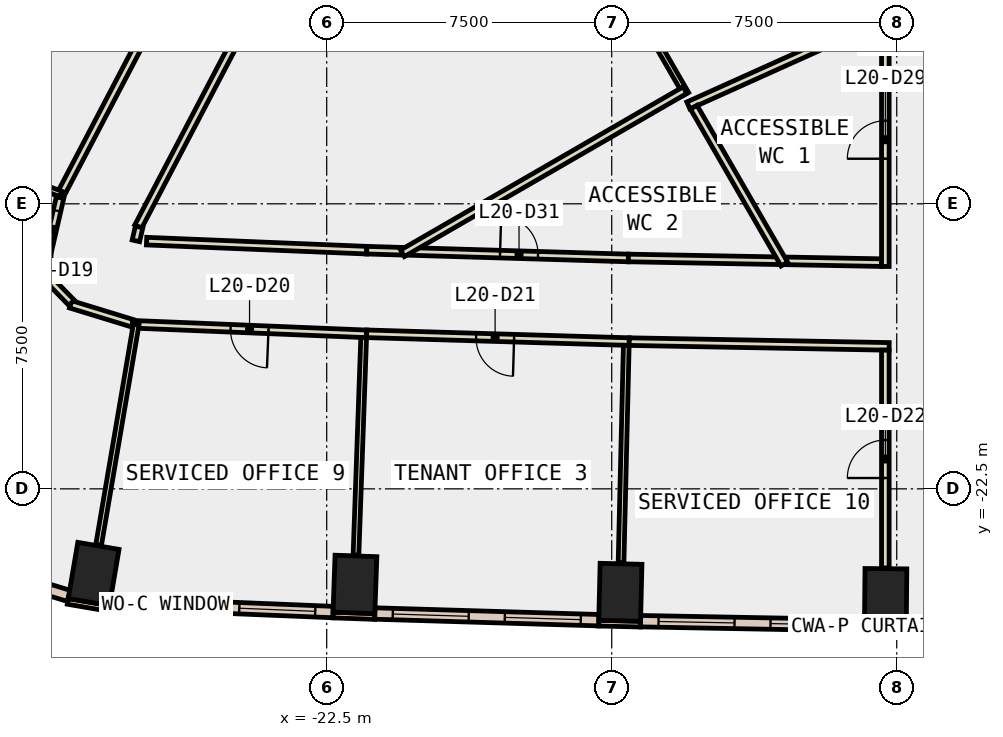
"""IFC4 building model, lengths in metres.
Left out: names, types, materials, properties, quantities, classifications, styles, units other than length and angle.
Written with IfcOpenShell. Run it as: python <this file> out.ifc"""

import sys

from ifc_helpers import new_model, si_unit, direction, frame, frame_2d, origin, origin_2d, place, context, subcontext, project, spatial, rectangle, extrude, element, fill, save


model = new_model("IFC4")
c1 = context("Model", 3, precision=1e-05, world=origin(), true_north=direction((0.0, 1.0)))
c2 = subcontext(c1, "Body", "Model", "MODEL_VIEW")
j1 = project(units=[si_unit("LENGTHUNIT", "METRE"), si_unit("PLANEANGLEUNIT", "RADIAN")], contexts=[c1])
p1 = place(None, origin())
s1 = spatial("IfcSite", under=j1, at=p1, CompositionType="ELEMENT")
p2 = place(p1, origin())
s2 = spatial("IfcBuilding", under=s1, at=p2, CompositionType="ELEMENT")
p3 = place(p2, frame((0.0, 0.0, 95.0)))
s3 = spatial("IfcBuildingStorey", under=s2, at=p3, CompositionType="ELEMENT", Elevation=95.0)
for number, where, z_axis, x_axis in (
    (1, (-28.633, -24.74, -0.4), (0.0, 0.0, 1.0), (-0.986, 0.168, 0.0)),
    (2, (-21.757, -25.015, -0.4), (0.0, 0.0, 1.0), (-0.999, 0.035, 0.0)),
    (3, (-14.773, -25.222, -0.4), (0.0, 0.0, 1.0), (-1.0, 0.024, 0.0)),
    (4, (-7.792, -25.351, -0.4), (0.0, 0.0, 1.0), (-1.0, 0.009, 0.0)),
):
    element("IfcColumn", number, at=place(p3, frame(where, z_axis=z_axis, x_axis=x_axis)), inside=s3, PredefinedType="COLUMN", context=c2, shape_type="SweptSolid", body=[
        extrude(rectangle(XDim=1.1, YDim=1.5, at=origin_2d()), origin(), (0.0, 0.0, 1.0), 4.2),
    ])
p4 = place(p3, frame((-29.314, -25.461, 0.0), z_axis=(0.0, 0.0, 1.0), x_axis=(0.985763338892, -0.168138751323, 0.0)))
e5 = element("IfcWall", 5, at=p4, inside=s3, PredefinedType="STANDARD", context=c2, shape_type="SweptSolid", body=[
    extrude(rectangle(XDim=1.101, YDim=0.15, at=frame_2d((0.55, 0.0))), origin(), (0.0, 0.0, 1.0), 3.8),
])
p5 = place(p3, frame((-22.336, -25.82, 0.0), z_axis=(0.0, 0.0, 1.0), x_axis=(0.999376638472, -0.035303462679, 0.0)))
e6 = element("IfcWall", 6, at=p5, inside=s3, PredefinedType="STANDARD", context=c2, shape_type="SweptSolid", body=[
    extrude(rectangle(XDim=1.1, YDim=0.15, at=frame_2d((0.55, 0.0))), origin(), (0.0, 0.0, 1.0), 3.8),
])
p6 = place(p3, frame((-15.343, -26.034, 0.0), z_axis=(0.0, 0.0, 1.0), x_axis=(0.999718180159, -0.023739424163, 0.0)))
e7 = element("IfcWall", 7, at=p6, inside=s3, PredefinedType="STANDARD", context=c2, shape_type="SweptSolid", body=[
    extrude(rectangle(XDim=1.1, YDim=0.15, at=frame_2d((0.55, 0.0))), origin(), (0.0, 0.0, 1.0), 3.8),
])
p7 = place(p3, frame((-8.349, -26.171, 0.0), z_axis=(0.0, 0.0, 1.0), x_axis=(0.99995860686, -0.009098602504, 0.0)))
e8 = element("IfcWall", 8, at=p7, inside=s3, PredefinedType="STANDARD", context=c2, shape_type="SweptSolid", body=[
    extrude(rectangle(XDim=1.1, YDim=0.15, at=frame_2d((0.55, 0.0))), origin(), (0.0, 0.0, 1.0), 3.8),
])
p8 = place(p3, frame((-28.205, -25.501, 0.0), z_axis=(0.0, 0.0, 1.0), x_axis=(0.999159360905, -0.040994774244, 0.0)))
e9 = element("IfcWall", 9, at=p8, inside=s3, PredefinedType="STANDARD", context=c2, shape_type="SweptSolid", body=[
    extrude(rectangle(XDim=5.878, YDim=0.3, at=frame_2d((2.939, 0.0))), origin(), (0.0, 0.0, 1.0), 3.8),
])
p9 = place(p8, frame((0.469, 0.0, 0.9)))
e10 = element("IfcOpeningElement", 10, at=p9, cuts=e9, PredefinedType="OPENING", context=c2, shape_type="SweptSolid", body=[
    extrude(rectangle(XDim=2.0, YDim=2.6, at=frame_2d((1.0, 1.3))), frame((0.0, 0.16, 0.0), z_axis=(0.0, -1.0, 0.0), x_axis=(1.0, 0.0, 0.0)), (0.0, 0.0, 1.0), 0.32),
])
p10 = place(p8, frame((3.408, 0.0, 0.9)))
e11 = element("IfcOpeningElement", 11, at=p10, cuts=e9, PredefinedType="OPENING", context=c2, shape_type="SweptSolid", body=[
    extrude(rectangle(XDim=2.0, YDim=2.6, at=frame_2d((1.0, 1.3))), frame((0.0, 0.16, 0.0), z_axis=(0.0, -1.0, 0.0), x_axis=(1.0, 0.0, 0.0)), (0.0, 0.0, 1.0), 0.32),
])
p11 = place(p3, frame((-21.235, -25.78, 0.0), z_axis=(0.0, 0.0, 1.0), x_axis=(0.999554487555, -0.029846715213, 0.0)))
e12 = element("IfcWall", 12, at=p11, inside=s3, PredefinedType="STANDARD", context=c2, shape_type="SweptSolid", body=[
    extrude(rectangle(XDim=5.898, YDim=0.3, at=frame_2d((2.949, 0.0))), origin(), (0.0, 0.0, 1.0), 3.8),
])
p12 = place(p11, frame((0.474, 0.0, 0.9)))
e13 = element("IfcOpeningElement", 13, at=p12, cuts=e12, PredefinedType="OPENING", context=c2, shape_type="SweptSolid", body=[
    extrude(rectangle(XDim=2.0, YDim=2.6, at=frame_2d((1.0, 1.3))), frame((0.0, 0.16, 0.0), z_axis=(0.0, -1.0, 0.0), x_axis=(1.0, 0.0, 0.0)), (0.0, 0.0, 1.0), 0.32),
])
p13 = place(p11, frame((3.423, 0.0, 0.9)))
e14 = element("IfcOpeningElement", 14, at=p13, cuts=e12, PredefinedType="OPENING", context=c2, shape_type="SweptSolid", body=[
    extrude(rectangle(XDim=2.0, YDim=2.6, at=frame_2d((1.0, 1.3))), frame((0.0, 0.16, 0.0), z_axis=(0.0, -1.0, 0.0), x_axis=(1.0, 0.0, 0.0)), (0.0, 0.0, 1.0), 0.32),
])
p14 = place(p3, frame((-14.242, -25.982, 0.0), z_axis=(0.0, 0.0, 1.0), x_axis=(0.999828633111, -0.018512277318, 0.0)))
e15 = element("IfcWall", 15, at=p14, inside=s3, PredefinedType="STANDARD", context=c2, shape_type="SweptSolid", body=[
    extrude(rectangle(XDim=5.895, YDim=0.3, at=frame_2d((2.948, 0.0))), origin(), (0.0, 0.0, 1.0), 3.8),
])
p15 = place(p14, frame((0.474, 0.0, 0.9)))
e16 = element("IfcOpeningElement", 16, at=p15, cuts=e15, PredefinedType="OPENING", context=c2, shape_type="SweptSolid", body=[
    extrude(rectangle(XDim=2.0, YDim=2.6, at=frame_2d((1.0, 1.3))), frame((0.0, 0.16, 0.0), z_axis=(0.0, -1.0, 0.0), x_axis=(1.0, 0.0, 0.0)), (0.0, 0.0, 1.0), 0.32),
])
p16 = place(p14, frame((3.421, 0.0, 0.9)))
e17 = element("IfcOpeningElement", 17, at=p16, cuts=e15, PredefinedType="OPENING", context=c2, shape_type="SweptSolid", body=[
    extrude(rectangle(XDim=2.0, YDim=2.6, at=frame_2d((1.0, 1.3))), frame((0.0, 0.16, 0.0), z_axis=(0.0, -1.0, 0.0), x_axis=(1.0, 0.0, 0.0)), (0.0, 0.0, 1.0), 0.32),
])
p17 = place(p3, frame((-32.549, -24.319, 0.0), z_axis=(0.0, 0.0, 1.0), x_axis=(0.956317661006, -0.292329490895, 0.0)))
e18 = element("IfcWall", 18, at=p17, inside=s3, PredefinedType="STANDARD", context=c2, shape_type="SweptSolid", body=[
    extrude(rectangle(XDim=3.41, YDim=0.3, at=frame_2d((1.705, 0.0))), origin(), (0.0, 0.0, 1.0), 3.8),
])
p18 = place(p17, frame((1.005, 0.0, 0.9)))
e19 = element("IfcOpeningElement", 19, at=p18, cuts=e18, PredefinedType="OPENING", context=c2, shape_type="SweptSolid", body=[
    extrude(rectangle(XDim=1.4, YDim=2.6, at=frame_2d((0.7, 1.3))), frame((0.0, 0.16, 0.0), z_axis=(0.0, -1.0, 0.0), x_axis=(1.0, 0.0, 0.0)), (0.0, 0.0, 1.0), 0.32),
])
p19 = place(p3, frame((-10.408, -16.501, 0.0), z_axis=(0.0, 0.0, 1.0), x_axis=(0.999823568917, -0.018783797216, 0.0)))
e20 = element("IfcWall", 20, at=p19, inside=s3, PredefinedType="PARTITIONING", context=c2, shape_type="SweptSolid", body=[
    extrude(rectangle(XDim=2.509, YDim=0.2, at=frame_2d((1.254, 0.0))), origin(), (0.0, 0.0, 1.0), 3.8),
])
p20 = place(p3, frame((-24.678, -10.29, 0.0), z_axis=(0.0, 0.0, 1.0), x_axis=(-0.464203280494, -0.885728691179, 0.0)))
e21 = element("IfcWall", 21, at=p20, inside=s3, PredefinedType="PARTITIONING", context=c2, shape_type="SweptSolid", body=[
    extrude(rectangle(XDim=5.995, YDim=0.2, at=frame_2d((2.998, 0.0))), origin(), (0.0, 0.0, 1.0), 3.8),
])
p21 = place(p3, frame((-27.437, -15.609, 0.0), z_axis=(0.0, 0.0, 1.0), x_axis=(-0.224098195188, -0.97456656977, 0.0)))
e22 = element("IfcWall", 22, at=p21, inside=s3, PredefinedType="PARTITIONING", context=c2, shape_type="SweptSolid", body=[
    extrude(rectangle(XDim=0.375, YDim=0.2, at=frame_2d((0.188, 0.0))), origin(), (0.0, 0.0, 1.0), 3.8),
])
p22 = place(p3, frame((-27.24, -15.982, 0.0), z_axis=(0.0, 0.0, 1.0), x_axis=(0.999157128819, -0.041049140426, 0.0)))
e23 = element("IfcWall", 23, at=p22, inside=s3, PredefinedType="PARTITIONING", context=c2, shape_type="SweptSolid", body=[
    extrude(rectangle(XDim=5.799, YDim=0.2, at=frame_2d((2.899, 0.0))), origin(), (0.0, 0.0, 1.0), 3.8),
])
p23 = place(p3, frame((-21.446, -16.22, 0.0), z_axis=(0.0, 0.0, 1.0), x_axis=(0.999542625536, -0.030241358047, 0.0)))
e24 = element("IfcWall", 24, at=p23, inside=s3, PredefinedType="PARTITIONING", context=c2, shape_type="SweptSolid", body=[
    extrude(rectangle(XDim=0.928, YDim=0.2, at=frame_2d((0.464, 0.0))), origin(), (0.0, 0.0, 1.0), 3.8),
])
p24 = place(p3, frame((-20.318, -16.253, 0.0), z_axis=(0.0, 0.0, 1.0), x_axis=(0.999553385537, -0.029883598524, 0.0)))
e25 = element("IfcWall", 25, at=p24, inside=s3, PredefinedType="PARTITIONING", context=c2, shape_type="SweptSolid", body=[
    extrude(rectangle(XDim=5.76, YDim=0.2, at=frame_2d((2.88, 0.0))), origin(), (0.0, 0.0, 1.0), 3.8),
])
p25 = place(p24, frame((2.38, 0.0, 0.0)))
e26 = element("IfcOpeningElement", 26, at=p25, cuts=e25, PredefinedType="OPENING", context=c2, shape_type="SweptSolid", body=[
    extrude(rectangle(XDim=1.0, YDim=2.1, at=frame_2d((0.5, 1.05))), frame((0.0, 0.11, 0.0), z_axis=(0.0, -1.0, 0.0), x_axis=(1.0, 0.0, 0.0)), (0.0, 0.0, 1.0), 0.22),
])
p26 = place(p3, frame((-14.561, -16.425, 0.0), z_axis=(0.0, 0.0, 1.0), x_axis=(0.999829548691, -0.018462761553, 0.0)))
e27 = element("IfcWall", 27, at=p26, inside=s3, PredefinedType="PARTITIONING", context=c2, shape_type="SweptSolid", body=[
    extrude(rectangle(XDim=3.954, YDim=0.2, at=frame_2d((1.977, 0.0))), origin(), (0.0, 0.0, 1.0), 3.8),
])
p27 = place(p3, frame((-29.541, -14.829, 0.0), z_axis=(0.0, 0.0, 1.0), x_axis=(0.46422598759, 0.885716790202, 0.0)))
e28 = element("IfcWall", 28, at=p27, inside=s3, PredefinedType="PARTITIONING", context=c2, shape_type="SweptSolid", body=[
    extrude(rectangle(XDim=6.29, YDim=0.2, at=frame_2d((3.145, 0.0))), origin(), (0.0, 0.0, 1.0), 3.8),
])
p28 = place(p3, frame((-27.608, -18.144, 0.0), z_axis=(0.0, 0.0, 1.0), x_axis=(-0.956137025409, 0.292919764852, 0.0)))
e29 = element("IfcWall", 29, at=p28, inside=s3, PredefinedType="PARTITIONING", context=c2, shape_type="SweptSolid", body=[
    extrude(rectangle(XDim=1.707, YDim=0.2, at=frame_2d((0.854, 0.0))), origin(), (0.0, 0.0, 1.0), 3.8),
])
p29 = place(p3, frame((-29.215, -17.602, 0.0), z_axis=(0.0, 0.0, 1.0), x_axis=(-0.698331924638, 0.715774072617, 0.0)))
e30 = element("IfcWall", 30, at=p29, inside=s3, PredefinedType="PARTITIONING", context=c2, shape_type="SweptSolid", body=[
    extrude(rectangle(XDim=0.756, YDim=0.2, at=frame_2d((0.378, 0.0))), origin(), (0.0, 0.0, 1.0), 3.8),
])
p30 = place(p3, frame((-29.701, -17.036, 0.0), z_axis=(0.0, 0.0, 1.0), x_axis=(-0.269792639482, 0.962918444979, 0.0)))
e31 = element("IfcWall", 31, at=p30, inside=s3, PredefinedType="PARTITIONING", context=c2, shape_type="SweptSolid", body=[
    extrude(rectangle(XDim=0.557, YDim=0.2, at=frame_2d((0.278, 0.0))), origin(), (0.0, 0.0, 1.0), 3.8),
])
p31 = place(p3, frame((-29.9, -16.501, 0.0), z_axis=(0.0, 0.0, 1.0), x_axis=(0.224316169854, 0.974516421587, 0.0)))
e32 = element("IfcWall", 32, at=p31, inside=s3, PredefinedType="PARTITIONING", context=c2, shape_type="SweptSolid", body=[
    extrude(rectangle(XDim=1.707, YDim=0.2, at=frame_2d((0.853, 0.0))), origin(), (0.0, 0.0, 1.0), 3.8),
])
p32 = place(p31, frame((0.353, 0.0, 0.0)))
e33 = element("IfcOpeningElement", 33, at=p32, cuts=e32, PredefinedType="OPENING", context=c2, shape_type="SweptSolid", body=[
    extrude(rectangle(XDim=1.0, YDim=2.1, at=frame_2d((0.5, 1.05))), frame((0.0, 0.11, 0.0), z_axis=(0.0, -1.0, 0.0), x_axis=(1.0, 0.0, 0.0)), (0.0, 0.0, 1.0), 0.22),
])
p33 = place(p3, frame((-21.449, -18.422, 0.0), z_axis=(0.0, 0.0, 1.0), x_axis=(-0.999157588083, 0.041037960189, 0.0)))
e34 = element("IfcWall", 34, at=p33, inside=s3, PredefinedType="PARTITIONING", context=c2, shape_type="SweptSolid", body=[
    extrude(rectangle(XDim=6.169, YDim=0.2, at=frame_2d((3.084, 0.0))), origin(), (0.0, 0.0, 1.0), 3.8),
])
p34 = place(p33, frame((2.584, 0.0, 0.0)))
e35 = element("IfcOpeningElement", 35, at=p34, cuts=e34, PredefinedType="OPENING", context=c2, shape_type="SweptSolid", body=[
    extrude(rectangle(XDim=1.0, YDim=2.1, at=frame_2d((0.5, 1.05))), frame((0.0, 0.11, 0.0), z_axis=(0.0, -1.0, 0.0), x_axis=(1.0, 0.0, 0.0)), (0.0, 0.0, 1.0), 0.22),
])
p35 = place(p3, frame((-14.539, -18.626, 0.0), z_axis=(0.0, 0.0, 1.0), x_axis=(-0.999555675329, 0.029806910574, 0.0)))
e36 = element("IfcWall", 36, at=p35, inside=s3, PredefinedType="PARTITIONING", context=c2, shape_type="SweptSolid", body=[
    extrude(rectangle(XDim=6.913, YDim=0.2, at=frame_2d((3.457, 0.0))), origin(), (0.0, 0.0, 1.0), 3.8),
])
p36 = place(p35, frame((3.031, 0.0, 0.0)))
e37 = element("IfcOpeningElement", 37, at=p36, cuts=e36, PredefinedType="OPENING", context=c2, shape_type="SweptSolid", body=[
    extrude(rectangle(XDim=1.0, YDim=2.1, at=frame_2d((0.5, 1.05))), frame((0.0, 0.11, 0.0), z_axis=(0.0, -1.0, 0.0), x_axis=(1.0, 0.0, 0.0)), (0.0, 0.0, 1.0), 0.22),
])
p37 = place(p3, frame((-7.7, -18.752, 0.0), z_axis=(0.0, 0.0, 1.0), x_axis=(-0.999830394604, 0.018416895142, 0.0)))
e38 = element("IfcWall", 38, at=p37, inside=s3, PredefinedType="PARTITIONING", context=c2, shape_type="SweptSolid", body=[
    extrude(rectangle(XDim=6.84, YDim=0.2, at=frame_2d((3.42, 0.0))), origin(), (0.0, 0.0, 1.0), 3.8),
])
p38 = place(p3, frame((-7.8, -16.649, 0.0), z_axis=(0.0, 0.0, 1.0), x_axis=(0.0, 1.0, 0.0)))
e39 = element("IfcWall", 39, at=p38, inside=s3, PredefinedType="PARTITIONING", context=c2, shape_type="SweptSolid", body=[
    extrude(rectangle(XDim=6.669, YDim=0.2, at=frame_2d((3.334, 0.0))), origin(), (0.0, 0.0, 1.0), 3.8),
])
p39 = place(p38, frame((2.835, 0.0, 0.0)))
e40 = element("IfcOpeningElement", 40, at=p39, cuts=e39, PredefinedType="OPENING", context=c2, shape_type="SweptSolid", body=[
    extrude(rectangle(XDim=1.0, YDim=2.1, at=frame_2d((0.5, 1.05))), frame((0.0, 0.11, 0.0), z_axis=(0.0, -1.0, 0.0), x_axis=(1.0, 0.0, 0.0)), (0.0, 0.0, 1.0), 0.22),
])
p40 = place(p3, frame((-7.8, -24.581, 0.0), z_axis=(0.0, 0.0, 1.0), x_axis=(0.0, 1.0, 0.0)))
e41 = element("IfcWall", 41, at=p40, inside=s3, PredefinedType="PARTITIONING", context=c2, shape_type="SweptSolid", body=[
    extrude(rectangle(XDim=5.731, YDim=0.2, at=frame_2d((2.865, 0.0))), origin(), (0.0, 0.0, 1.0), 3.8),
])
p41 = place(p40, frame((2.366, 0.0, 0.0)))
e42 = element("IfcOpeningElement", 42, at=p41, cuts=e41, PredefinedType="OPENING", context=c2, shape_type="SweptSolid", body=[
    extrude(rectangle(XDim=1.0, YDim=2.1, at=frame_2d((0.5, 1.05))), frame((0.0, 0.11, 0.0), z_axis=(0.0, -1.0, 0.0), x_axis=(1.0, 0.0, 0.0)), (0.0, 0.0, 1.0), 0.22),
])
p42 = place(p3, frame((-7.8, -10.08, 0.0), z_axis=(0.0, 0.0, 1.0), x_axis=(-0.911938383636, -0.410327167577, 0.0)))
e43 = element("IfcWall", 43, at=p42, inside=s3, PredefinedType="PARTITIONING", context=c2, shape_type="SweptSolid", body=[
    extrude(rectangle(XDim=5.683, YDim=0.2, at=frame_2d((2.842, 0.0))), origin(), (0.0, 0.0, 1.0), 3.8),
])
p43 = place(p3, frame((-13.043, -12.108, 0.0), z_axis=(0.0, 0.0, 1.0), x_axis=(-0.499947764329, 0.866055559963, 0.0)))
e44 = element("IfcWall", 44, at=p43, inside=s3, PredefinedType="PARTITIONING", context=c2, shape_type="SweptSolid", body=[
    extrude(rectangle(XDim=3.564, YDim=0.15, at=frame_2d((1.782, 0.0))), origin(), (0.0, 0.0, 1.0), 3.8),
])
p44 = place(p3, frame((-10.458, -16.586, 0.0), z_axis=(0.0, 0.0, 1.0), x_axis=(-0.500121439648, 0.865955279218, 0.0)))
e45 = element("IfcWall", 45, at=p44, inside=s3, PredefinedType="PARTITIONING", context=c2, shape_type="SweptSolid", body=[
    extrude(rectangle(XDim=4.767, YDim=0.2, at=frame_2d((2.383, 0.0))), origin(), (0.0, 0.0, 1.0), 3.8),
])
p45 = place(p3, frame((-13.072, -12.009, 0.0), z_axis=(0.0, 0.0, 1.0), x_axis=(-0.865993734772, -0.500054848326, 0.0)))
e46 = element("IfcWall", 46, at=p45, inside=s3, PredefinedType="PARTITIONING", context=c2, shape_type="SweptSolid", body=[
    extrude(rectangle(XDim=8.583, YDim=0.2, at=frame_2d((4.292, 0.0))), origin(), (0.0, 0.0, 1.0), 3.8),
])
p46 = place(p3, frame((-29.494, -14.741, 0.0), z_axis=(0.0, 0.0, 1.0), x_axis=(-0.937719767819, 0.347392626636, 0.0)))
e47 = element("IfcWall", 47, at=p46, inside=s3, PredefinedType="PARTITIONING", context=c2, shape_type="SweptSolid", body=[
    extrude(rectangle(XDim=5.892, YDim=0.15, at=frame_2d((2.946, 0.0))), origin(), (0.0, 0.0, 1.0), 3.8),
])
p47 = place(p3, frame((-27.513, -18.173, 0.0), z_axis=(0.0, 0.0, 1.0), x_axis=(-0.168033262309, -0.985781326034, 0.0)))
e48 = element("IfcWall", 48, at=p47, inside=s3, PredefinedType="PARTITIONING", context=c2, shape_type="SweptSolid", body=[
    extrude(rectangle(XDim=5.892, YDim=0.15, at=frame_2d((2.946, 0.0))), origin(), (0.0, 0.0, 1.0), 3.8),
])
p48 = place(p3, frame((-21.527, -18.519, 0.0), z_axis=(0.0, 0.0, 1.0), x_axis=(-0.035408838092, -0.999372910472, 0.0)))
e49 = element("IfcWall", 49, at=p48, inside=s3, PredefinedType="PARTITIONING", context=c2, shape_type="SweptSolid", body=[
    extrude(rectangle(XDim=5.73, YDim=0.15, at=frame_2d((2.865, 0.0))), origin(), (0.0, 0.0, 1.0), 3.8),
])
p49 = place(p3, frame((-14.617, -18.724, 0.0), z_axis=(0.0, 0.0, 1.0), x_axis=(-0.02407553942, -0.999710142192, 0.0)))
e50 = element("IfcWall", 50, at=p49, inside=s3, PredefinedType="PARTITIONING", context=c2, shape_type="SweptSolid", body=[
    extrude(rectangle(XDim=5.729, YDim=0.15, at=frame_2d((2.865, 0.0))), origin(), (0.0, 0.0, 1.0), 3.8),
])
p50 = place(p9, origin())
e51 = element("IfcWindow", 51, at=p50, inside=s3, PartitioningType="SINGLE_PANEL", PredefinedType="WINDOW", context=c2, shape_type="SweptSolid", body=[
    extrude(rectangle(XDim=2.0, YDim=2.6, at=frame_2d((1.0, 1.3))), frame((0.0, 0.03, 0.0), z_axis=(0.0, -1.0, 0.0), x_axis=(1.0, 0.0, 0.0)), (0.0, 0.0, 1.0), 0.06),
])
fill(e10, e51)
p51 = place(p10, origin())
e52 = element("IfcWindow", 52, at=p51, inside=s3, PartitioningType="SINGLE_PANEL", PredefinedType="WINDOW", context=c2, shape_type="SweptSolid", body=[
    extrude(rectangle(XDim=2.0, YDim=2.6, at=frame_2d((1.0, 1.3))), frame((0.0, 0.03, 0.0), z_axis=(0.0, -1.0, 0.0), x_axis=(1.0, 0.0, 0.0)), (0.0, 0.0, 1.0), 0.06),
])
fill(e11, e52)
p52 = place(p12, origin())
e53 = element("IfcWindow", 53, at=p52, inside=s3, PartitioningType="SINGLE_PANEL", PredefinedType="WINDOW", context=c2, shape_type="SweptSolid", body=[
    extrude(rectangle(XDim=2.0, YDim=2.6, at=frame_2d((1.0, 1.3))), frame((0.0, 0.03, 0.0), z_axis=(0.0, -1.0, 0.0), x_axis=(1.0, 0.0, 0.0)), (0.0, 0.0, 1.0), 0.06),
])
fill(e13, e53)
p53 = place(p13, origin())
e54 = element("IfcWindow", 54, at=p53, inside=s3, PartitioningType="SINGLE_PANEL", PredefinedType="WINDOW", context=c2, shape_type="SweptSolid", body=[
    extrude(rectangle(XDim=2.0, YDim=2.6, at=frame_2d((1.0, 1.3))), frame((0.0, 0.03, 0.0), z_axis=(0.0, -1.0, 0.0), x_axis=(1.0, 0.0, 0.0)), (0.0, 0.0, 1.0), 0.06),
])
fill(e14, e54)
p54 = place(p15, origin())
e55 = element("IfcWindow", 55, at=p54, inside=s3, PartitioningType="SINGLE_PANEL", PredefinedType="WINDOW", context=c2, shape_type="SweptSolid", body=[
    extrude(rectangle(XDim=2.0, YDim=2.6, at=frame_2d((1.0, 1.3))), frame((0.0, 0.03, 0.0), z_axis=(0.0, -1.0, 0.0), x_axis=(1.0, 0.0, 0.0)), (0.0, 0.0, 1.0), 0.06),
])
fill(e16, e55)
p55 = place(p16, origin())
e56 = element("IfcWindow", 56, at=p55, inside=s3, PartitioningType="SINGLE_PANEL", PredefinedType="WINDOW", context=c2, shape_type="SweptSolid", body=[
    extrude(rectangle(XDim=2.0, YDim=2.6, at=frame_2d((1.0, 1.3))), frame((0.0, 0.03, 0.0), z_axis=(0.0, -1.0, 0.0), x_axis=(1.0, 0.0, 0.0)), (0.0, 0.0, 1.0), 0.06),
])
fill(e17, e56)
p56 = place(p32, origin())
e57 = element("IfcDoor", 57, at=p56, inside=s3, OperationType="SINGLE_SWING_RIGHT", PredefinedType="DOOR", context=c2, shape_type="SweptSolid", body=[
    extrude(rectangle(XDim=1.0, YDim=2.1, at=frame_2d((0.5, 1.05))), frame((0.0, 0.025, 0.0), z_axis=(0.0, -1.0, 0.0), x_axis=(1.0, 0.0, 0.0)), (0.0, 0.0, 1.0), 0.05),
])
fill(e33, e57)
p57 = place(p34, origin())
e58 = element("IfcDoor", 58, at=p57, inside=s3, OperationType="SINGLE_SWING_LEFT", PredefinedType="DOOR", context=c2, shape_type="SweptSolid", body=[
    extrude(rectangle(XDim=1.0, YDim=2.1, at=frame_2d((0.5, 1.05))), frame((0.0, 0.025, 0.0), z_axis=(0.0, -1.0, 0.0), x_axis=(1.0, 0.0, 0.0)), (0.0, 0.0, 1.0), 0.05),
])
fill(e35, e58)
p58 = place(p36, origin())
e59 = element("IfcDoor", 59, at=p58, inside=s3, OperationType="SINGLE_SWING_LEFT", PredefinedType="DOOR", context=c2, shape_type="SweptSolid", body=[
    extrude(rectangle(XDim=1.0, YDim=2.1, at=frame_2d((0.5, 1.05))), frame((0.0, 0.025, 0.0), z_axis=(0.0, -1.0, 0.0), x_axis=(1.0, 0.0, 0.0)), (0.0, 0.0, 1.0), 0.05),
])
fill(e37, e59)
p59 = place(p41, origin())
e60 = element("IfcDoor", 60, at=p59, inside=s3, OperationType="SINGLE_SWING_LEFT", PredefinedType="DOOR", context=c2, shape_type="SweptSolid", body=[
    extrude(rectangle(XDim=1.0, YDim=2.1, at=frame_2d((0.5, 1.05))), frame((0.0, 0.025, 0.0), z_axis=(0.0, -1.0, 0.0), x_axis=(1.0, 0.0, 0.0)), (0.0, 0.0, 1.0), 0.05),
])
fill(e42, e60)
p60 = place(p39, origin())
e61 = element("IfcDoor", 61, at=p60, inside=s3, OperationType="SINGLE_SWING_LEFT", PredefinedType="DOOR", context=c2, shape_type="SweptSolid", body=[
    extrude(rectangle(XDim=1.0, YDim=2.1, at=frame_2d((0.5, 1.05))), frame((0.0, 0.025, 0.0), z_axis=(0.0, -1.0, 0.0), x_axis=(1.0, 0.0, 0.0)), (0.0, 0.0, 1.0), 0.05),
])
fill(e40, e61)
p61 = place(p25, origin())
e62 = element("IfcDoor", 62, at=p61, inside=s3, OperationType="SINGLE_SWING_LEFT", PredefinedType="DOOR", context=c2, shape_type="SweptSolid", body=[
    extrude(rectangle(XDim=1.0, YDim=2.1, at=frame_2d((0.5, 1.05))), frame((0.0, 0.025, 0.0), z_axis=(0.0, -1.0, 0.0), x_axis=(1.0, 0.0, 0.0)), (0.0, 0.0, 1.0), 0.05),
])
fill(e26, e62)
save(model, sys.argv[1])
